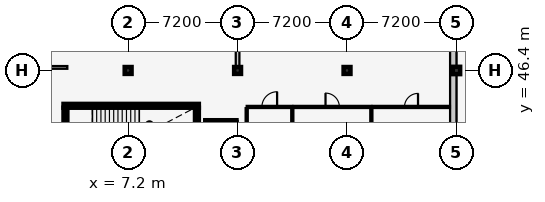
"""IFC4 building model, lengths in metres.
Left out: names, types, materials, properties, quantities, classifications, styles, units other than length and angle.
Written with IfcOpenShell. Run it as: python <this file> out.ifc"""

import sys

from ifc_helpers import new_model, si_unit, direction, frame, frame_2d, origin, origin_2d, place, context, subcontext, project, spatial, rectangle, extrude, element, fill, save


model = new_model("IFC4")
c1 = context("Model", 3, precision=1e-05, world=origin(), true_north=direction((0.0, 1.0)))
c2 = subcontext(c1, "Body", "Model", "MODEL_VIEW")
j1 = project(units=[si_unit("LENGTHUNIT", "METRE"), si_unit("PLANEANGLEUNIT", "RADIAN")], contexts=[c1])
p1 = place(None, origin())
s1 = spatial("IfcSite", under=j1, at=p1, CompositionType="ELEMENT")
p2 = place(p1, origin())
s2 = spatial("IfcBuilding", under=s1, at=p2, CompositionType="ELEMENT")
p3 = place(p2, frame((0.0, 0.0, 13.8)))
s3 = spatial("IfcBuildingStorey", under=s2, at=p3, CompositionType="ELEMENT", Elevation=13.8)
for number, where, z_axis, x_axis in (
    (1, (7.2, 46.4, 0.0), (0.0, 0.0, 1.0), (1.0, 0.0, 0.0)),
    (2, (14.4, 46.4, 0.0), (0.0, 0.0, 1.0), (1.0, 0.0, 0.0)),
    (3, (21.6, 46.4, 0.0), (0.0, 0.0, 1.0), (1.0, 0.0, 0.0)),
):
    element("IfcColumn", number, at=place(p3, frame(where, z_axis=z_axis, x_axis=x_axis)), inside=s3, PredefinedType="COLUMN", context=c2, shape_type="SweptSolid", body=[
        extrude(rectangle(XDim=0.45, YDim=0.45, at=origin_2d()), origin(), (0.0, 0.0, 1.0), 4.2),
    ])
p4 = place(p3, frame((28.8, 46.4, 0.0), z_axis=(0.0, 0.0, 1.0), x_axis=(1.0, 0.0, 0.0)))
e4 = element("IfcColumn", 4, at=p4, inside=s3, PredefinedType="COLUMN", context=c2, shape_type="SweptSolid", body=[
    extrude(rectangle(XDim=0.48, YDim=0.48, at=origin_2d()), origin(), (0.0, 0.0, 1.0), 4.2),
])
p5 = place(p3, frame((28.59, 60.8, 0.0), z_axis=(0.0, 0.0, 1.0), x_axis=(0.0, -1.0, 0.0)))
e5 = element("IfcWall", 5, at=p5, inside=s3, PredefinedType="SOLIDWALL", context=c2, shape_type="SweptSolid", body=[
    extrude(rectangle(XDim=21.6, YDim=0.42, at=frame_2d((10.8, 0.0))), origin(), (0.0, 0.0, 1.0), 3.205),
])
p6 = place(p5, frame((10.1, 0.0, 0.0)))
e6 = element("IfcOpeningElement", 6, at=p6, cuts=e5, PredefinedType="OPENING", context=c2, shape_type="SweptSolid", body=[
    extrude(rectangle(XDim=1.4, YDim=2.2, at=frame_2d((0.7, 1.1))), frame((0.0, 0.222, 0.0), z_axis=(0.0, -1.0, 0.0), x_axis=(1.0, 0.0, 0.0)), (0.0, 0.0, 1.0), 0.444),
])
p7 = place(p5, frame((1.25, 0.0, 0.9)))
e7 = element("IfcOpeningElement", 7, at=p7, cuts=e5, PredefinedType="OPENING", context=c2, shape_type="SweptSolid", body=[
    extrude(rectangle(XDim=1.1, YDim=1.35, at=frame_2d((0.55, 0.675))), frame((0.0, 0.222, 0.0), z_axis=(0.0, -1.0, 0.0), x_axis=(1.0, 0.0, 0.0)), (0.0, 0.0, 1.0), 0.444),
])
p8 = place(p5, frame((4.8, 0.0, 0.9)))
e8 = element("IfcOpeningElement", 8, at=p8, cuts=e5, PredefinedType="OPENING", context=c2, shape_type="SweptSolid", body=[
    extrude(rectangle(XDim=1.2, YDim=1.35, at=frame_2d((0.6, 0.675))), frame((0.0, 0.222, 0.0), z_axis=(0.0, -1.0, 0.0), x_axis=(1.0, 0.0, 0.0)), (0.0, 0.0, 1.0), 0.444),
])
p9 = place(p5, frame((19.275, 0.0, 0.9)))
e9 = element("IfcOpeningElement", 9, at=p9, cuts=e5, PredefinedType="OPENING", context=c2, shape_type="SweptSolid", body=[
    extrude(rectangle(XDim=1.05, YDim=1.45, at=frame_2d((0.525, 0.725))), frame((0.0, 0.222, 0.0), z_axis=(0.0, -1.0, 0.0), x_axis=(1.0, 0.0, 0.0)), (0.0, 0.0, 1.0), 0.444),
])
p10 = place(p3, frame((11.85, 44.075, 0.0), z_axis=(0.0, 0.0, 1.0), x_axis=(-1.0, 0.0, 0.0)))
e10 = element("IfcWall", 10, at=p10, inside=s3, PredefinedType="SHEAR", context=c2, shape_type="SweptSolid", body=[
    extrude(rectangle(XDim=8.9, YDim=0.25, at=frame_2d((4.45, 0.0))), origin(), (0.0, 0.0, 1.0), 3.96),
])
p11 = place(p3, frame((3.075, 43.95, 0.0), z_axis=(0.0, 0.0, 1.0), x_axis=(0.0, -1.0, 0.0)))
e11 = element("IfcWall", 11, at=p11, inside=s3, PredefinedType="SHEAR", context=c2, shape_type="SweptSolid", body=[
    extrude(rectangle(XDim=3.55, YDim=0.25, at=frame_2d((1.775, 0.0))), origin(), (0.0, 0.0, 1.0), 3.96),
])
p12 = place(p11, frame((1.15, 0.0, 0.0)))
e12 = element("IfcOpeningElement", 12, at=p12, cuts=e11, PredefinedType="OPENING", context=c2, shape_type="SweptSolid", body=[
    extrude(rectangle(XDim=1.25, YDim=2.15, at=frame_2d((0.625, 1.075))), frame((0.0, 0.137, 0.0), z_axis=(0.0, -1.0, 0.0), x_axis=(1.0, 0.0, 0.0)), (0.0, 0.0, 1.0), 0.274),
])
p13 = place(p3, frame((11.725, 40.4, 0.0), z_axis=(0.0, 0.0, 1.0), x_axis=(0.0, 1.0, 0.0)))
e13 = element("IfcWall", 13, at=p13, inside=s3, PredefinedType="SHEAR", context=c2, shape_type="SweptSolid", body=[
    extrude(rectangle(XDim=3.55, YDim=0.25, at=frame_2d((1.775, 0.0))), origin(), (0.0, 0.0, 1.0), 3.96),
])
p14 = place(p3, frame((14.325, 43.0, 0.0), z_axis=(0.0, 0.0, 1.0), x_axis=(-1.0, 0.0, 0.0)))
e14 = element("IfcWall", 14, at=p14, inside=s3, PredefinedType="SHEAR", context=c2, shape_type="SweptSolid", body=[
    extrude(rectangle(XDim=2.05, YDim=0.25, at=frame_2d((1.025, 0.0))), origin(), (0.0, 0.0, 1.0), 3.96),
])
p15 = place(p14, frame((0.55, 0.0, 0.0)))
e15 = element("IfcOpeningElement", 15, at=p15, cuts=e14, PredefinedType="OPENING", context=c2, shape_type="SweptSolid", body=[
    extrude(rectangle(XDim=0.95, YDim=2.1, at=frame_2d((0.475, 1.05))), frame((0.0, 0.137, 0.0), z_axis=(0.0, -1.0, 0.0), x_axis=(1.0, 0.0, 0.0)), (0.0, 0.0, 1.0), 0.274),
])
p16 = place(p3, frame((0.43, 46.6, 0.0), z_axis=(0.0, 0.0, 1.0), x_axis=(1.0, 0.0, 0.0)))
e16 = element("IfcWall", 16, at=p16, inside=s3, PredefinedType="PARTITIONING", context=c2, shape_type="SweptSolid", body=[
    extrude(rectangle(XDim=2.77, YDim=0.18, at=frame_2d((1.385, 0.0))), origin(), (0.0, 0.0, 1.0), 3.185),
])
p17 = place(p3, frame((14.4, 46.6, 0.0), z_axis=(0.0, 0.0, 1.0), x_axis=(0.0, 1.0, 0.0)))
e17 = element("IfcWall", 17, at=p17, inside=s3, PredefinedType="PARTITIONING", context=c2, shape_type="SweptSolid", body=[
    extrude(rectangle(XDim=13.77, YDim=0.24, at=frame_2d((6.885, 0.0))), origin(), (0.0, 0.0, 1.0), 3.335),
])
p18 = place(p17, frame((2.66, 0.0, 0.0)))
e18 = element("IfcOpeningElement", 18, at=p18, cuts=e17, PredefinedType="OPENING", context=c2, shape_type="SweptSolid", body=[
    extrude(rectangle(XDim=1.68, YDim=2.3, at=frame_2d((0.84, 1.15))), frame((0.0, 0.132, 0.0), z_axis=(0.0, -1.0, 0.0), x_axis=(1.0, 0.0, 0.0)), (0.0, 0.0, 1.0), 0.264),
])
p19 = place(p3, frame((15.0, 44.0, 0.0), z_axis=(0.0, 0.0, 1.0), x_axis=(1.0, 0.0, 0.0)))
e19 = element("IfcWall", 19, at=p19, inside=s3, PredefinedType="PARTITIONING", context=c2, shape_type="SweptSolid", body=[
    extrude(rectangle(XDim=3.0, YDim=0.14, at=frame_2d((1.5, 0.0))), origin(), (0.0, 0.0, 1.0), 3.96),
])
p20 = place(p19, frame((1.0, 0.0, 0.0)))
e20 = element("IfcOpeningElement", 20, at=p20, cuts=e19, PredefinedType="OPENING", context=c2, shape_type="SweptSolid", body=[
    extrude(rectangle(XDim=1.0, YDim=2.1, at=frame_2d((0.5, 1.05))), frame((0.0, 0.082, 0.0), z_axis=(0.0, -1.0, 0.0), x_axis=(1.0, 0.0, 0.0)), (0.0, 0.0, 1.0), 0.164),
])
p21 = place(p3, frame((15.0, 39.63, 0.0), z_axis=(0.0, 0.0, 1.0), x_axis=(0.0, 1.0, 0.0)))
e21 = element("IfcWall", 21, at=p21, inside=s3, PredefinedType="PARTITIONING", context=c2, shape_type="SweptSolid", body=[
    extrude(rectangle(XDim=4.29, YDim=0.14, at=frame_2d((2.145, 0.0))), origin(), (0.0, 0.0, 1.0), 3.96),
])
p22 = place(p3, frame((18.0, 39.63, 0.0), z_axis=(0.0, 0.0, 1.0), x_axis=(0.0, 1.0, 0.0)))
e22 = element("IfcWall", 22, at=p22, inside=s3, PredefinedType="PARTITIONING", context=c2, shape_type="SweptSolid", body=[
    extrude(rectangle(XDim=4.29, YDim=0.14, at=frame_2d((2.145, 0.0))), origin(), (0.0, 0.0, 1.0), 3.764),
])
p23 = place(p3, frame((18.08, 44.0, 0.0), z_axis=(0.0, 0.0, 1.0), x_axis=(1.0, 0.0, 0.0)))
e23 = element("IfcWall", 23, at=p23, inside=s3, PredefinedType="PARTITIONING", context=c2, shape_type="SweptSolid", body=[
    extrude(rectangle(XDim=5.12, YDim=0.14, at=frame_2d((2.56, 0.0))), origin(), (0.0, 0.0, 1.0), 3.96),
])
p24 = place(p23, frame((2.105, 0.0, 0.0)))
e24 = element("IfcOpeningElement", 24, at=p24, cuts=e23, PredefinedType="OPENING", context=c2, shape_type="SweptSolid", body=[
    extrude(rectangle(XDim=0.91, YDim=2.06, at=frame_2d((0.455, 1.03))), frame((0.0, 0.082, 0.0), z_axis=(0.0, -1.0, 0.0), x_axis=(1.0, 0.0, 0.0)), (0.0, 0.0, 1.0), 0.164),
])
p25 = place(p3, frame((23.2, 39.63, 0.0), z_axis=(0.0, 0.0, 1.0), x_axis=(0.0, 1.0, 0.0)))
e25 = element("IfcWall", 25, at=p25, inside=s3, PredefinedType="PARTITIONING", context=c2, shape_type="SweptSolid", body=[
    extrude(rectangle(XDim=4.29, YDim=0.14, at=frame_2d((2.145, 0.0))), origin(), (0.0, 0.0, 1.0), 3.95),
])
p26 = place(p3, frame((23.28, 44.0, 0.0), z_axis=(0.0, 0.0, 1.0), x_axis=(1.0, 0.0, 0.0)))
e26 = element("IfcWall", 26, at=p26, inside=s3, PredefinedType="PARTITIONING", context=c2, shape_type="SweptSolid", body=[
    extrude(rectangle(XDim=5.09, YDim=0.14, at=frame_2d((2.545, 0.0))), origin(), (0.0, 0.0, 1.0), 3.95),
])
p27 = place(p26, frame((2.1, 0.0, 0.0)))
e27 = element("IfcOpeningElement", 27, at=p27, cuts=e26, PredefinedType="OPENING", context=c2, shape_type="SweptSolid", body=[
    extrude(rectangle(XDim=0.89, YDim=2.05, at=frame_2d((0.445, 1.025))), frame((0.0, 0.082, 0.0), z_axis=(0.0, -1.0, 0.0), x_axis=(1.0, 0.0, 0.0)), (0.0, 0.0, 1.0), 0.164),
])
p28 = place(p15, origin())
e28 = element("IfcDoor", 28, at=p28, inside=s3, OperationType="SLIDING_TO_LEFT", PredefinedType="DOOR", context=c2, shape_type="SweptSolid", body=[
    extrude(rectangle(XDim=0.95, YDim=2.1, at=frame_2d((0.475, 1.05))), frame((0.0, 0.025, 0.0), z_axis=(0.0, -1.0, 0.0), x_axis=(1.0, 0.0, 0.0)), (0.0, 0.0, 1.0), 0.05),
])
fill(e15, e28)
p29 = place(p20, origin())
e29 = element("IfcDoor", 29, at=p29, inside=s3, OperationType="SINGLE_SWING_RIGHT", PredefinedType="DOOR", context=c2, shape_type="SweptSolid", body=[
    extrude(rectangle(XDim=1.0, YDim=2.1, at=frame_2d((0.5, 1.05))), frame((0.0, 0.025, 0.0), z_axis=(0.0, -1.0, 0.0), x_axis=(1.0, 0.0, 0.0)), (0.0, 0.0, 1.0), 0.05),
])
fill(e20, e29)
p30 = place(p24, origin())
e30 = element("IfcDoor", 30, at=p30, inside=s3, OperationType="SINGLE_SWING_LEFT", PredefinedType="DOOR", context=c2, shape_type="SweptSolid", body=[
    extrude(rectangle(XDim=0.91, YDim=2.06, at=frame_2d((0.455, 1.03))), frame((0.0, 0.025, 0.0), z_axis=(0.0, -1.0, 0.0), x_axis=(1.0, 0.0, 0.0)), (0.0, 0.0, 1.0), 0.05),
])
fill(e24, e30)
p31 = place(p27, origin())
e31 = element("IfcDoor", 31, at=p31, inside=s3, OperationType="SINGLE_SWING_RIGHT", PredefinedType="DOOR", context=c2, shape_type="SweptSolid", body=[
    extrude(rectangle(XDim=0.89, YDim=2.05, at=frame_2d((0.445, 1.025))), frame((0.0, 0.025, 0.0), z_axis=(0.0, -1.0, 0.0), x_axis=(1.0, 0.0, 0.0)), (0.0, 0.0, 1.0), 0.05),
])
fill(e27, e31)
save(model, sys.argv[1])
